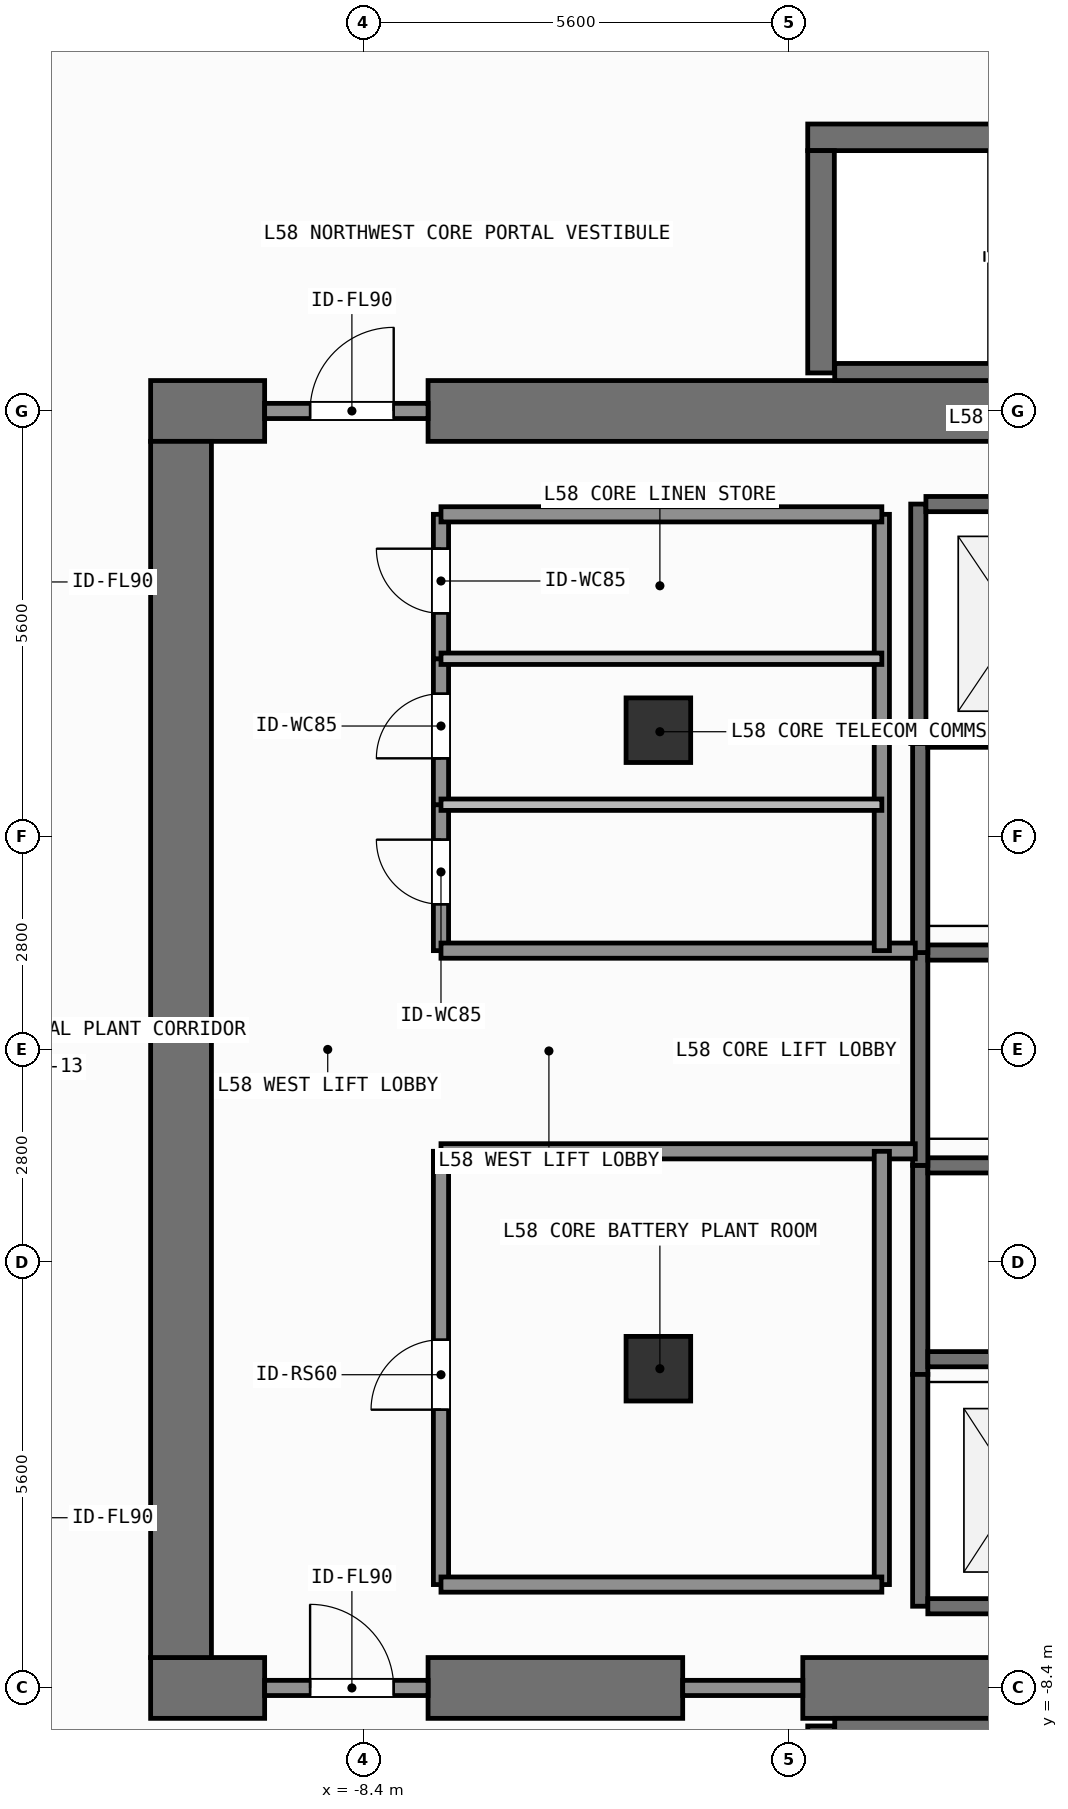
"""IFC4 building model, lengths in metres.
Left out: names, types, materials, properties, quantities, classifications, styles, units other than length and angle.
Written with IfcOpenShell. Run it as: python <this file> out.ifc"""

import sys

from ifc_helpers import new_model, si_unit, direction, frame, frame_2d, origin, origin_2d, place, context, subcontext, project, spatial, rectangle, extrude, element, fill, save


model = new_model("IFC4")
c1 = context("Model", 3, precision=1e-05, world=origin(), true_north=direction((0.0, 1.0)))
c2 = subcontext(c1, "Body", "Model", "MODEL_VIEW")
j1 = project(units=[si_unit("LENGTHUNIT", "METRE"), si_unit("PLANEANGLEUNIT", "RADIAN")], contexts=[c1])
p1 = place(None, origin())
s1 = spatial("IfcSite", under=j1, at=p1, CompositionType="ELEMENT")
p2 = place(p1, origin())
s2 = spatial("IfcBuilding", under=s1, at=p2, CompositionType="ELEMENT")
p3 = place(p2, frame((0.0, 0.0, 235.2)))
s3 = spatial("IfcBuildingStorey", under=s2, at=p3, CompositionType="ELEMENT", Elevation=235.2)
p4 = place(p3, frame((-11.2, -8.4, 0.0), z_axis=(0.0, 0.0, 1.0), x_axis=(1.0, 0.0, 0.0)))
e1 = element("IfcWall", 1, at=p4, inside=s3, PredefinedType="SHEAR", context=c2, shape_type="SweptSolid", body=[
    extrude(rectangle(XDim=1.5, YDim=0.8, at=frame_2d((0.75, 0.0))), origin(), (0.0, 0.0, 1.0), 7.8),
])
p5 = place(p3, frame((-7.55, -8.4, 0.0), z_axis=(0.0, 0.0, 1.0), x_axis=(1.0, 0.0, 0.0)))
e2 = element("IfcWall", 2, at=p5, inside=s3, PredefinedType="SHEAR", context=c2, shape_type="SweptSolid", body=[
    extrude(rectangle(XDim=3.35, YDim=0.8, at=frame_2d((1.675, 0.0))), origin(), (0.0, 0.0, 1.0), 7.8),
])
p6 = place(p3, frame((-2.62, -8.4, 0.0), z_axis=(0.0, 0.0, 1.0), x_axis=(1.0, 0.0, 0.0)))
e3 = element("IfcWall", 3, at=p6, inside=s3, PredefinedType="SHEAR", context=c2, shape_type="SweptSolid", body=[
    extrude(rectangle(XDim=7.27, YDim=0.8, at=frame_2d((3.635, 0.0))), origin(), (0.0, 0.0, 1.0), 7.8),
])
p7 = place(p3, frame((-11.2, 8.4, 0.0), z_axis=(0.0, 0.0, 1.0), x_axis=(1.0, 0.0, 0.0)))
e4 = element("IfcWall", 4, at=p7, inside=s3, PredefinedType="SHEAR", context=c2, shape_type="SweptSolid", body=[
    extrude(rectangle(XDim=1.5, YDim=0.8, at=frame_2d((0.75, 0.0))), origin(), (0.0, 0.0, 1.0), 7.8),
])
p8 = place(p3, frame((-7.55, 8.4, 0.0), z_axis=(0.0, 0.0, 1.0), x_axis=(1.0, 0.0, 0.0)))
e5 = element("IfcWall", 5, at=p8, inside=s3, PredefinedType="SHEAR", context=c2, shape_type="SweptSolid", body=[
    extrude(rectangle(XDim=16.35, YDim=0.8, at=frame_2d((8.175, 0.0))), origin(), (0.0, 0.0, 1.0), 7.8),
])
p9 = place(p3, frame((-10.8, -8.0, 0.0), z_axis=(0.0, 0.0, 1.0), x_axis=(0.0, 1.0, 0.0)))
e6 = element("IfcWall", 6, at=p9, inside=s3, PredefinedType="SHEAR", context=c2, shape_type="SweptSolid", body=[
    extrude(rectangle(XDim=16.0, YDim=0.8, at=frame_2d((8.0, 0.0))), origin(), (0.0, 0.0, 1.0), 7.8),
])
p10 = place(p3, frame((-2.2, -8.913, 0.0), z_axis=(0.0, 0.0, 1.0), x_axis=(1.0, 0.0, 0.0)))
e7 = element("IfcWall", 7, at=p10, inside=s3, PredefinedType="SHEAR", context=c2, shape_type="SweptSolid", body=[
    extrude(rectangle(XDim=6.6, YDim=0.225, at=frame_2d((3.3, 0.0))), origin(), (0.0, 0.0, 1.0), 7.8),
])
p11 = place(p3, frame((-2.38, -11.825, 0.0), z_axis=(0.0, 0.0, 1.0), x_axis=(0.0, 1.0, 0.0)))
e8 = element("IfcWall", 8, at=p11, inside=s3, PredefinedType="SHEAR", context=c2, shape_type="SweptSolid", body=[
    extrude(rectangle(XDim=2.925, YDim=0.35, at=frame_2d((1.462, 0.0))), origin(), (0.0, 0.0, 1.0), 7.8),
])
p12 = place(p3, frame((-2.555, 12.0, 0.0), z_axis=(0.0, 0.0, 1.0), x_axis=(1.0, 0.0, 0.0)))
e9 = element("IfcWall", 9, at=p12, inside=s3, PredefinedType="SHEAR", context=c2, shape_type="SweptSolid", body=[
    extrude(rectangle(XDim=7.31, YDim=0.35, at=frame_2d((3.655, 0.0))), origin(), (0.0, 0.0, 1.0), 7.8),
])
p13 = place(p3, frame((-2.2, 8.913, 0.0), z_axis=(0.0, 0.0, 1.0), x_axis=(1.0, 0.0, 0.0)))
e10 = element("IfcWall", 10, at=p13, inside=s3, PredefinedType="SHEAR", context=c2, shape_type="SweptSolid", body=[
    extrude(rectangle(XDim=6.6, YDim=0.225, at=frame_2d((3.3, 0.0))), origin(), (0.0, 0.0, 1.0), 7.8),
])
p14 = place(p3, frame((-2.38, 8.9, 0.0), z_axis=(0.0, 0.0, 1.0), x_axis=(0.0, 1.0, 0.0)))
e11 = element("IfcWall", 11, at=p14, inside=s3, PredefinedType="SHEAR", context=c2, shape_type="SweptSolid", body=[
    extrude(rectangle(XDim=2.925, YDim=0.35, at=frame_2d((1.462, 0.0))), origin(), (0.0, 0.0, 1.0), 7.8),
])
for number, where, z_axis, x_axis in (
    (12, (-4.52, -4.2, 0.0), (0.0, 0.0, 1.0), (1.0, 0.0, 0.0)),
    (13, (-4.52, 4.2, 0.0), (0.0, 0.0, 1.0), (1.0, 0.0, 0.0)),
):
    element("IfcColumn", number, at=place(p3, frame(where, z_axis=z_axis, x_axis=x_axis)), inside=s3, PredefinedType="COLUMN", context=c2, shape_type="SweptSolid", body=[
        extrude(rectangle(XDim=0.85, YDim=0.85, at=origin_2d()), origin(), (0.0, 0.0, 1.0), 7.8),
    ])
p15 = place(p3, frame((-1.075, -4.275, 0.0), z_axis=(0.0, 0.0, 1.0), x_axis=(0.0, 1.0, 0.0)))
e14 = element("IfcWall", 14, at=p15, inside=s3, PredefinedType="SHEAR", context=c2, shape_type="SweptSolid", body=[
    extrude(rectangle(XDim=2.75, YDim=0.2, at=frame_2d((1.375, 0.0))), origin(), (0.0, 0.0, 1.0), 7.58),
])
for number, where, z_axis, x_axis in (
    (15, (-0.975, -4.075, 0.0), (0.0, 0.0, 1.0), (1.0, 0.0, 0.0)),
    (16, (-0.975, -1.525, 0.0), (0.0, 0.0, 1.0), (1.0, 0.0, 0.0)),
):
    element("IfcWall", number, at=place(p3, frame(where, z_axis=z_axis, x_axis=x_axis)), inside=s3, PredefinedType="SHEAR", context=c2, shape_type="SweptSolid", body=[
        extrude(rectangle(XDim=2.35, YDim=0.2, at=frame_2d((1.175, 0.0))), origin(), (0.0, 0.0, 1.0), 7.58),
    ])
p16 = place(p3, frame((-1.075, -1.525, 0.0), z_axis=(0.0, 0.0, 1.0), x_axis=(0.0, 1.0, 0.0)))
e17 = element("IfcWall", 17, at=p16, inside=s3, PredefinedType="SHEAR", context=c2, shape_type="SweptSolid", body=[
    extrude(rectangle(XDim=2.8, YDim=0.2, at=frame_2d((1.4, 0.0))), origin(), (0.0, 0.0, 1.0), 7.58),
])
p17 = place(p3, frame((-0.975, 1.275, 0.0), z_axis=(0.0, 0.0, 1.0), x_axis=(1.0, 0.0, 0.0)))
e18 = element("IfcWall", 18, at=p17, inside=s3, PredefinedType="SHEAR", context=c2, shape_type="SweptSolid", body=[
    extrude(rectangle(XDim=2.35, YDim=0.2, at=frame_2d((1.175, 0.0))), origin(), (0.0, 0.0, 1.0), 7.58),
])
p18 = place(p3, frame((-1.075, 1.275, 0.0), z_axis=(0.0, 0.0, 1.0), x_axis=(0.0, 1.0, 0.0)))
e19 = element("IfcWall", 19, at=p18, inside=s3, PredefinedType="SHEAR", context=c2, shape_type="SweptSolid", body=[
    extrude(rectangle(XDim=2.8, YDim=0.2, at=frame_2d((1.4, 0.0))), origin(), (0.0, 0.0, 1.0), 7.58),
])
p19 = place(p3, frame((-0.975, 4.075, 0.0), z_axis=(0.0, 0.0, 1.0), x_axis=(1.0, 0.0, 0.0)))
e20 = element("IfcWall", 20, at=p19, inside=s3, PredefinedType="SHEAR", context=c2, shape_type="SweptSolid", body=[
    extrude(rectangle(XDim=2.35, YDim=0.2, at=frame_2d((1.175, 0.0))), origin(), (0.0, 0.0, 1.0), 7.58),
])
p20 = place(p3, frame((-1.1, 4.025, 0.0), z_axis=(0.0, 0.0, 1.0), x_axis=(0.0, 1.0, 0.0)))
e21 = element("IfcWall", 21, at=p20, inside=s3, PredefinedType="SHEAR", context=c2, shape_type="SweptSolid", body=[
    extrude(rectangle(XDim=3.15, YDim=0.2, at=frame_2d((1.575, 0.0))), origin(), (0.0, 0.0, 1.0), 7.58),
])
p21 = place(p3, frame((-1.0, 7.175, 0.0), z_axis=(0.0, 0.0, 1.0), x_axis=(1.0, 0.0, 0.0)))
e22 = element("IfcWall", 22, at=p21, inside=s3, PredefinedType="SHEAR", context=c2, shape_type="SweptSolid", body=[
    extrude(rectangle(XDim=2.4, YDim=0.2, at=frame_2d((1.2, 0.0))), origin(), (0.0, 0.0, 1.0), 7.58),
])
p22 = place(p3, frame((-1.075, -7.325, 0.0), z_axis=(0.0, 0.0, 1.0), x_axis=(0.0, 1.0, 0.0)))
e23 = element("IfcWall", 23, at=p22, inside=s3, PredefinedType="SHEAR", context=c2, shape_type="SweptSolid", body=[
    extrude(rectangle(XDim=3.05, YDim=0.2, at=frame_2d((1.525, 0.0))), origin(), (0.0, 0.0, 1.0), 7.58),
])
p23 = place(p3, frame((-0.975, -7.325, 0.0), z_axis=(0.0, 0.0, 1.0), x_axis=(1.0, 0.0, 0.0)))
e24 = element("IfcWall", 24, at=p23, inside=s3, PredefinedType="SHEAR", context=c2, shape_type="SweptSolid", body=[
    extrude(rectangle(XDim=2.35, YDim=0.2, at=frame_2d((1.175, 0.0))), origin(), (0.0, 0.0, 1.0), 7.58),
])
p24 = place(p3, frame((-9.7, -8.4, 0.0), z_axis=(0.0, 0.0, 1.0), x_axis=(1.0, 0.0, 0.0)))
e25 = element("IfcWall", 25, at=p24, inside=s3, PredefinedType="SOLIDWALL", context=c2, shape_type="SweptSolid", body=[
    extrude(rectangle(XDim=2.15, YDim=0.2, at=frame_2d((1.075, 0.0))), origin(), (0.0, 0.0, 1.0), 6.72),
])
p25 = place(p24, frame((0.598, 0.0, 0.0)))
e26 = element("IfcOpeningElement", 26, at=p25, cuts=e25, PredefinedType="OPENING", context=c2, shape_type="SweptSolid", body=[
    extrude(rectangle(XDim=1.1, YDim=2.15, at=frame_2d((0.55, 1.075))), frame((0.0, 0.11, 0.0), z_axis=(0.0, -1.0, 0.0), x_axis=(1.0, 0.0, 0.0)), (0.0, 0.0, 1.0), 0.22),
])
p26 = place(p3, frame((-9.7, 8.4, 0.0), z_axis=(0.0, 0.0, 1.0), x_axis=(1.0, 0.0, 0.0)))
e27 = element("IfcWall", 27, at=p26, inside=s3, PredefinedType="SOLIDWALL", context=c2, shape_type="SweptSolid", body=[
    extrude(rectangle(XDim=2.15, YDim=0.2, at=frame_2d((1.075, 0.0))), origin(), (0.0, 0.0, 1.0), 6.72),
])
p27 = place(p26, frame((0.598, 0.0, 0.0)))
e28 = element("IfcOpeningElement", 28, at=p27, cuts=e27, PredefinedType="OPENING", context=c2, shape_type="SweptSolid", body=[
    extrude(rectangle(XDim=1.1, YDim=2.15, at=frame_2d((0.55, 1.075))), frame((0.0, 0.11, 0.0), z_axis=(0.0, -1.0, 0.0), x_axis=(1.0, 0.0, 0.0)), (0.0, 0.0, 1.0), 0.22),
])
p28 = place(p3, frame((-7.38, -7.04, 0.0), z_axis=(0.0, 0.0, 1.0), x_axis=(0.0, 1.0, 0.0)))
e29 = element("IfcWall", 29, at=p28, inside=s3, PredefinedType="SOLIDWALL", context=c2, shape_type="SweptSolid", body=[
    extrude(rectangle(XDim=5.7, YDim=0.2, at=frame_2d((2.85, 0.0))), origin(), (0.0, 0.0, 1.0), 7.58),
])
p29 = place(p28, frame((2.301, 0.0, 0.0)))
e30 = element("IfcOpeningElement", 30, at=p29, cuts=e29, PredefinedType="OPENING", context=c2, shape_type="SweptSolid", body=[
    extrude(rectangle(XDim=0.92, YDim=2.1, at=frame_2d((0.46, 1.05))), frame((0.0, 0.11, 0.0), z_axis=(0.0, -1.0, 0.0), x_axis=(1.0, 0.0, 0.0)), (0.0, 0.0, 1.0), 0.22),
])
p30 = place(p3, frame((-7.38, 1.3, 0.0), z_axis=(0.0, 0.0, 1.0), x_axis=(0.0, 1.0, 0.0)))
e31 = element("IfcWall", 31, at=p30, inside=s3, PredefinedType="SOLIDWALL", context=c2, shape_type="SweptSolid", body=[
    extrude(rectangle(XDim=1.92, YDim=0.2, at=frame_2d((0.96, 0.0))), origin(), (0.0, 0.0, 1.0), 7.58),
])
p31 = place(p30, frame((0.61, 0.0, 0.0)))
e32 = element("IfcOpeningElement", 32, at=p31, cuts=e31, PredefinedType="OPENING", context=c2, shape_type="SweptSolid", body=[
    extrude(rectangle(XDim=0.85, YDim=2.1, at=frame_2d((0.425, 1.05))), frame((0.0, 0.11, 0.0), z_axis=(0.0, -1.0, 0.0), x_axis=(1.0, 0.0, 0.0)), (0.0, 0.0, 1.0), 0.22),
])
p32 = place(p3, frame((-7.38, 3.22, 0.0), z_axis=(0.0, 0.0, 1.0), x_axis=(0.0, 1.0, 0.0)))
e33 = element("IfcWall", 33, at=p32, inside=s3, PredefinedType="SOLIDWALL", context=c2, shape_type="SweptSolid", body=[
    extrude(rectangle(XDim=1.92, YDim=0.2, at=frame_2d((0.96, 0.0))), origin(), (0.0, 0.0, 1.0), 7.58),
])
p33 = place(p32, frame((0.61, 0.0, 0.0)))
e34 = element("IfcOpeningElement", 34, at=p33, cuts=e33, PredefinedType="OPENING", context=c2, shape_type="SweptSolid", body=[
    extrude(rectangle(XDim=0.85, YDim=2.1, at=frame_2d((0.425, 1.05))), frame((0.0, 0.11, 0.0), z_axis=(0.0, -1.0, 0.0), x_axis=(1.0, 0.0, 0.0)), (0.0, 0.0, 1.0), 0.22),
])
p34 = place(p3, frame((-7.38, 5.14, 0.0), z_axis=(0.0, 0.0, 1.0), x_axis=(0.0, 1.0, 0.0)))
e35 = element("IfcWall", 35, at=p34, inside=s3, PredefinedType="SOLIDWALL", context=c2, shape_type="SweptSolid", body=[
    extrude(rectangle(XDim=1.9, YDim=0.2, at=frame_2d((0.95, 0.0))), origin(), (0.0, 0.0, 1.0), 7.58),
])
p35 = place(p34, frame((0.598, 0.0, 0.0)))
e36 = element("IfcOpeningElement", 36, at=p35, cuts=e35, PredefinedType="OPENING", context=c2, shape_type="SweptSolid", body=[
    extrude(rectangle(XDim=0.85, YDim=2.1, at=frame_2d((0.425, 1.05))), frame((0.0, 0.11, 0.0), z_axis=(0.0, -1.0, 0.0), x_axis=(1.0, 0.0, 0.0)), (0.0, 0.0, 1.0), 0.22),
])
p36 = place(p3, frame((-4.2, -8.4, 0.0), z_axis=(0.0, 0.0, 1.0), x_axis=(1.0, 0.0, 0.0)))
e37 = element("IfcWall", 37, at=p36, inside=s3, PredefinedType="SOLIDWALL", context=c2, shape_type="SweptSolid", body=[
    extrude(rectangle(XDim=1.58, YDim=0.2, at=frame_2d((0.79, 0.0))), origin(), (0.0, 0.0, 1.0), 6.72),
])
for number, where, z_axis, x_axis in (
    (38, (-7.38, -1.34, 0.0), (0.0, 0.0, 1.0), (1.0, 0.0, 0.0)),
    (39, (-7.38, 1.3, 0.0), (0.0, 0.0, 1.0), (1.0, 0.0, 0.0)),
):
    element("IfcWall", number, at=place(p3, frame(where, z_axis=z_axis, x_axis=x_axis)), inside=s3, PredefinedType="SOLIDWALL", context=c2, shape_type="SweptSolid", body=[
        extrude(rectangle(XDim=6.24, YDim=0.2, at=frame_2d((3.12, 0.0))), origin(), (0.0, 0.0, 1.0), 7.58),
    ])
p37 = place(p3, frame((-1.58, -7.04, 0.0), z_axis=(0.0, 0.0, 1.0), x_axis=(0.0, 1.0, 0.0)))
e40 = element("IfcWall", 40, at=p37, inside=s3, PredefinedType="SOLIDWALL", context=c2, shape_type="SweptSolid", body=[
    extrude(rectangle(XDim=5.7, YDim=0.2, at=frame_2d((2.85, 0.0))), origin(), (0.0, 0.0, 1.0), 7.58),
])
p38 = place(p3, frame((-7.38, -7.04, 0.0), z_axis=(0.0, 0.0, 1.0), x_axis=(1.0, 0.0, 0.0)))
e41 = element("IfcWall", 41, at=p38, inside=s3, PredefinedType="SOLIDWALL", context=c2, shape_type="SweptSolid", body=[
    extrude(rectangle(XDim=5.8, YDim=0.2, at=frame_2d((2.9, 0.0))), origin(), (0.0, 0.0, 1.0), 7.58),
])
p39 = place(p3, frame((-1.58, 1.3, 0.0), z_axis=(0.0, 0.0, 1.0), x_axis=(0.0, 1.0, 0.0)))
e42 = element("IfcWall", 42, at=p39, inside=s3, PredefinedType="SOLIDWALL", context=c2, shape_type="SweptSolid", body=[
    extrude(rectangle(XDim=5.74, YDim=0.2, at=frame_2d((2.87, 0.0))), origin(), (0.0, 0.0, 1.0), 7.58),
])
p40 = place(p3, frame((-7.38, 7.04, 0.0), z_axis=(0.0, 0.0, 1.0), x_axis=(1.0, 0.0, 0.0)))
e43 = element("IfcWall", 43, at=p40, inside=s3, PredefinedType="SOLIDWALL", context=c2, shape_type="SweptSolid", body=[
    extrude(rectangle(XDim=5.8, YDim=0.2, at=frame_2d((2.9, 0.0))), origin(), (0.0, 0.0, 1.0), 7.58),
])
for number, where, z_axis, x_axis in (
    (44, (-7.38, 3.22, 0.0), (0.0, 0.0, 1.0), (1.0, 0.0, 0.0)),
    (45, (-7.38, 5.14, 0.0), (0.0, 0.0, 1.0), (1.0, 0.0, 0.0)),
):
    element("IfcWall", number, at=place(p3, frame(where, z_axis=z_axis, x_axis=x_axis)), inside=s3, PredefinedType="PARTITIONING", context=c2, shape_type="SweptSolid", body=[
        extrude(rectangle(XDim=5.8, YDim=0.15, at=frame_2d((2.9, 0.0))), origin(), (0.0, 0.0, 1.0), 7.58),
    ])
p41 = place(p25, origin())
e46 = element("IfcDoor", 46, at=p41, inside=s3, OperationType="SINGLE_SWING_LEFT", PredefinedType="DOOR", context=c2, shape_type="SweptSolid", body=[
    extrude(rectangle(XDim=1.1, YDim=2.15, at=frame_2d((0.55, 1.075))), frame((0.0, 0.025, 0.0), z_axis=(0.0, -1.0, 0.0), x_axis=(1.0, 0.0, 0.0)), (0.0, 0.0, 1.0), 0.05),
])
fill(e26, e46)
p42 = place(p27, origin())
e47 = element("IfcDoor", 47, at=p42, inside=s3, OperationType="SINGLE_SWING_RIGHT", PredefinedType="DOOR", context=c2, shape_type="SweptSolid", body=[
    extrude(rectangle(XDim=1.1, YDim=2.15, at=frame_2d((0.55, 1.075))), frame((0.0, 0.025, 0.0), z_axis=(0.0, -1.0, 0.0), x_axis=(1.0, 0.0, 0.0)), (0.0, 0.0, 1.0), 0.05),
])
fill(e28, e47)
p43 = place(p29, origin())
e48 = element("IfcDoor", 48, at=p43, inside=s3, OperationType="SINGLE_SWING_LEFT", PredefinedType="DOOR", context=c2, shape_type="SweptSolid", body=[
    extrude(rectangle(XDim=0.92, YDim=2.1, at=frame_2d((0.46, 1.05))), frame((0.0, 0.025, 0.0), z_axis=(0.0, -1.0, 0.0), x_axis=(1.0, 0.0, 0.0)), (0.0, 0.0, 1.0), 0.05),
])
fill(e30, e48)
p44 = place(p31, origin())
e49 = element("IfcDoor", 49, at=p44, inside=s3, OperationType="SINGLE_SWING_RIGHT", PredefinedType="DOOR", context=c2, shape_type="SweptSolid", body=[
    extrude(rectangle(XDim=0.85, YDim=2.1, at=frame_2d((0.425, 1.05))), frame((0.0, 0.025, 0.0), z_axis=(0.0, -1.0, 0.0), x_axis=(1.0, 0.0, 0.0)), (0.0, 0.0, 1.0), 0.05),
])
fill(e32, e49)
p45 = place(p33, origin())
e50 = element("IfcDoor", 50, at=p45, inside=s3, OperationType="SINGLE_SWING_LEFT", PredefinedType="DOOR", context=c2, shape_type="SweptSolid", body=[
    extrude(rectangle(XDim=0.85, YDim=2.1, at=frame_2d((0.425, 1.05))), frame((0.0, 0.025, 0.0), z_axis=(0.0, -1.0, 0.0), x_axis=(1.0, 0.0, 0.0)), (0.0, 0.0, 1.0), 0.05),
])
fill(e34, e50)
p46 = place(p35, origin())
e51 = element("IfcDoor", 51, at=p46, inside=s3, OperationType="SINGLE_SWING_RIGHT", PredefinedType="DOOR", context=c2, shape_type="SweptSolid", body=[
    extrude(rectangle(XDim=0.85, YDim=2.1, at=frame_2d((0.425, 1.05))), frame((0.0, 0.025, 0.0), z_axis=(0.0, -1.0, 0.0), x_axis=(1.0, 0.0, 0.0)), (0.0, 0.0, 1.0), 0.05),
])
fill(e36, e51)
save(model, sys.argv[1])
